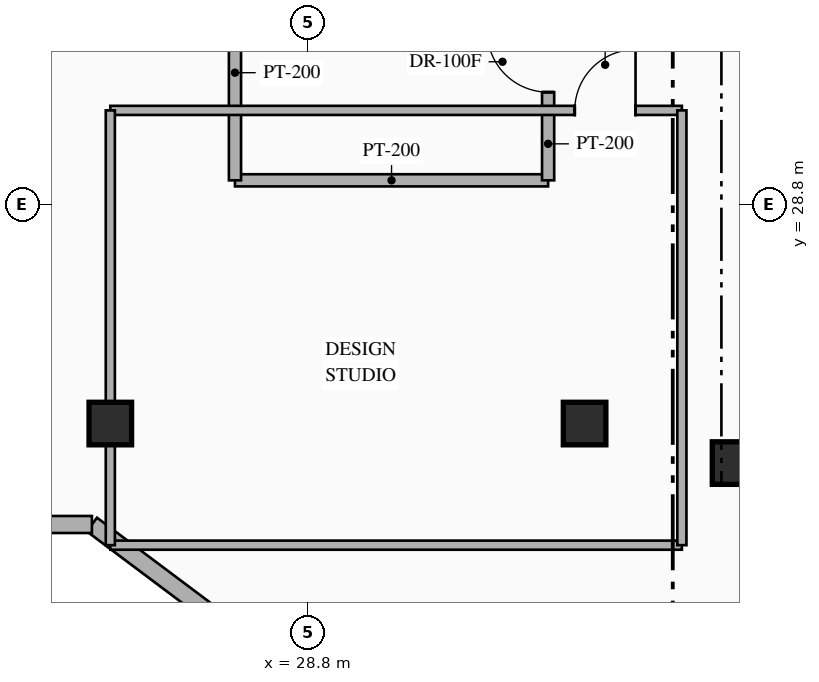
"""IFC4 building model, lengths in metres.
Left out: names, types, materials, properties, quantities, classifications, styles, units other than length and angle.
Written with IfcOpenShell. Run it as: python <this file> out.ifc"""

import sys

from ifc_helpers import new_model, si_unit, direction, frame, frame_2d, origin, origin_2d, place, context, subcontext, project, spatial, rectangle, hollow_rectangle, extrude, element, fill, save


model = new_model("IFC4")
c1 = context("Model", 3, precision=1e-05, world=origin(), true_north=direction((0.0, 1.0)))
c2 = subcontext(c1, "Body", "Model", "MODEL_VIEW")
j1 = project(units=[si_unit("LENGTHUNIT", "METRE"), si_unit("PLANEANGLEUNIT", "RADIAN")], contexts=[c1])
p1 = place(None, origin())
s1 = spatial("IfcSite", under=j1, at=p1, CompositionType="ELEMENT")
p2 = place(p1, origin())
s2 = spatial("IfcBuilding", under=s1, at=p2, CompositionType="ELEMENT")
p3 = place(p2, frame((0.0, 0.0, 216.75)))
s3 = spatial("IfcBuildingStorey", under=s2, at=p3, CompositionType="ELEMENT", Elevation=216.75)
for number, where, z_axis, x_axis in (
    (1, (35.8, 24.55, 0.0), (0.0, 0.0, 1.0), (1.0, 0.0, 0.0)),
    (2, (25.55, 25.2, 0.0), (0.0, 0.0, 1.0), (1.0, 0.0, 0.0)),
    (3, (33.35, 25.2, 0.0), (0.0, 0.0, 1.0), (1.0, 0.0, 0.0)),
):
    element("IfcColumn", number, at=place(p3, frame(where, z_axis=z_axis, x_axis=x_axis)), inside=s3, PredefinedType="COLUMN", context=c2, shape_type="SweptSolid", body=[
        extrude(hollow_rectangle(XDim=0.7, YDim=0.7, WallThickness=0.028, at=origin_2d()), origin(), (0.0, 0.0, 1.0), 3.6),
    ])
p4 = place(p3, frame((44.918, 8.787, 0.0), z_axis=(0.0, 0.0, 1.0), x_axis=(-0.800004765927, 0.599993645378, 0.0)))
e4 = element("IfcWall", 4, at=p4, inside=s3, PredefinedType="STANDARD", context=c2, shape_type="SweptSolid", body=[
    extrude(rectangle(XDim=24.588, YDim=0.28, at=frame_2d((12.294, 0.0))), origin(), (0.0, 0.0, 1.0), 3.35),
])
p5 = place(p3, frame((25.247, 23.54, 0.0), z_axis=(0.0, 0.0, 1.0), x_axis=(-1.0, 0.0, 0.0)))
e5 = element("IfcWall", 5, at=p5, inside=s3, PredefinedType="STANDARD", context=c2, shape_type="SweptSolid", body=[
    extrude(rectangle(XDim=4.789, YDim=0.28, at=frame_2d((2.395, 0.0))), origin(), (0.0, 0.0, 1.0), 3.35),
])
p6 = place(p3, frame((27.6, 29.2, 0.0), z_axis=(0.0, 0.0, 1.0), x_axis=(1.0, 0.0, 0.0)))
e6 = element("IfcWall", 6, at=p6, inside=s3, PredefinedType="STANDARD", context=c2, shape_type="SweptSolid", body=[
    extrude(rectangle(XDim=5.15, YDim=0.2, at=frame_2d((2.575, 0.0))), origin(), (0.0, 0.0, 1.0), 3.35),
])
p7 = place(p3, frame((27.6, 29.2, 0.0), z_axis=(0.0, 0.0, 1.0), x_axis=(0.0, 1.0, 0.0)))
e7 = element("IfcWall", 7, at=p7, inside=s3, PredefinedType="STANDARD", context=c2, shape_type="SweptSolid", body=[
    extrude(rectangle(XDim=3.54, YDim=0.2, at=frame_2d((1.77, 0.0))), origin(), (0.0, 0.0, 1.0), 3.35),
])
p8 = place(p3, frame((32.75, 29.2, 0.0), z_axis=(0.0, 0.0, 1.0), x_axis=(0.0, 1.0, 0.0)))
e8 = element("IfcWall", 8, at=p8, inside=s3, PredefinedType="STANDARD", context=c2, shape_type="SweptSolid", body=[
    extrude(rectangle(XDim=3.54, YDim=0.2, at=frame_2d((1.77, 0.0))), origin(), (0.0, 0.0, 1.0), 3.35),
])
p9 = place(p8, frame((1.45, 0.0, 0.0)))
e9 = element("IfcOpeningElement", 9, at=p9, cuts=e8, PredefinedType="OPENING", context=c2, shape_type="SweptSolid", body=[
    extrude(rectangle(XDim=1.0, YDim=2.2, at=frame_2d((0.5, 1.1))), frame((0.0, 0.11, 0.0), z_axis=(0.0, -1.0, 0.0), x_axis=(1.0, 0.0, 0.0)), (0.0, 0.0, 1.0), 0.22),
])
p10 = place(p3, frame((25.55, 23.2, 0.0), z_axis=(0.0, 0.0, 1.0), x_axis=(1.0, 0.0, 0.0)))
e10 = element("IfcWall", 10, at=p10, inside=s3, PredefinedType="PARTITIONING", context=c2, shape_type="SweptSolid", body=[
    extrude(rectangle(XDim=9.4, YDim=0.15, at=frame_2d((4.7, 0.0))), origin(), (0.0, 0.0, 1.0), 3.35),
])
p11 = place(p3, frame((25.55, 30.35, 0.0), z_axis=(0.0, 0.0, 1.0), x_axis=(1.0, 0.0, 0.0)))
e11 = element("IfcWall", 11, at=p11, inside=s3, PredefinedType="PARTITIONING", context=c2, shape_type="SweptSolid", body=[
    extrude(rectangle(XDim=9.4, YDim=0.15, at=frame_2d((4.7, 0.0))), origin(), (0.0, 0.0, 1.0), 3.35),
])
p12 = place(p11, frame((7.638, 0.0, 0.0)))
e12 = element("IfcOpeningElement", 12, at=p12, cuts=e11, PredefinedType="OPENING", context=c2, shape_type="SweptSolid", body=[
    extrude(rectangle(XDim=1.0, YDim=2.15, at=frame_2d((0.5, 1.075))), frame((0.0, 0.085, 0.0), z_axis=(0.0, -1.0, 0.0), x_axis=(1.0, 0.0, 0.0)), (0.0, 0.0, 1.0), 0.17),
])
p13 = place(p3, frame((25.55, 23.2, 0.0), z_axis=(0.0, 0.0, 1.0), x_axis=(0.0, 1.0, 0.0)))
e13 = element("IfcWall", 13, at=p13, inside=s3, PredefinedType="PARTITIONING", context=c2, shape_type="SweptSolid", body=[
    extrude(rectangle(XDim=7.15, YDim=0.15, at=frame_2d((3.575, 0.0))), origin(), (0.0, 0.0, 1.0), 2.757),
])
p14 = place(p3, frame((34.95, 23.2, 0.0), z_axis=(0.0, 0.0, 1.0), x_axis=(0.0, 1.0, 0.0)))
e14 = element("IfcWall", 14, at=p14, inside=s3, PredefinedType="PARTITIONING", context=c2, shape_type="SweptSolid", body=[
    extrude(rectangle(XDim=7.15, YDim=0.15, at=frame_2d((3.575, 0.0))), origin(), (0.0, 0.0, 1.0), 3.35),
])
p15 = place(p9, origin())
e15 = element("IfcDoor", 15, at=p15, inside=s3, OperationType="SINGLE_SWING_RIGHT", PredefinedType="DOOR", context=c2, shape_type="SweptSolid", body=[
    extrude(rectangle(XDim=1.0, YDim=2.2, at=frame_2d((0.5, 1.1))), frame((0.0, 0.025, 0.0), z_axis=(0.0, -1.0, 0.0), x_axis=(1.0, 0.0, 0.0)), (0.0, 0.0, 1.0), 0.05),
])
fill(e9, e15)
p16 = place(p12, origin())
e16 = element("IfcDoor", 16, at=p16, inside=s3, OperationType="SINGLE_SWING_RIGHT", PredefinedType="DOOR", context=c2, shape_type="SweptSolid", body=[
    extrude(rectangle(XDim=1.0, YDim=2.15, at=frame_2d((0.5, 1.075))), frame((0.0, 0.025, 0.0), z_axis=(0.0, -1.0, 0.0), x_axis=(1.0, 0.0, 0.0)), (0.0, 0.0, 1.0), 0.05),
])
fill(e12, e16)
save(model, sys.argv[1])
